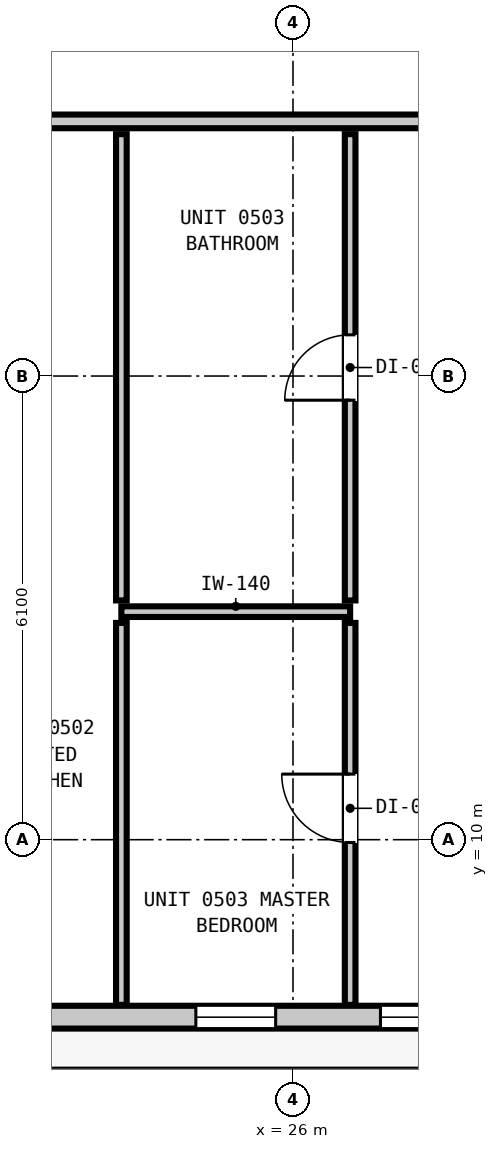
"""IFC4 building model, lengths in metres.
Left out: names, types, materials, properties, quantities, classifications, styles, units other than length and angle.
Written with IfcOpenShell. Run it as: python <this file> out.ifc"""

import sys

from ifc_helpers import new_model, si_unit, direction, frame, frame_2d, origin, place, context, subcontext, project, spatial, rectangle, extrude, element, fill, save


model = new_model("IFC4")
c1 = context("Model", 3, precision=1e-05, world=origin(), true_north=direction((0.0, 1.0)))
c2 = subcontext(c1, "Body", "Model", "MODEL_VIEW")
j1 = project(units=[si_unit("LENGTHUNIT", "METRE"), si_unit("PLANEANGLEUNIT", "RADIAN")], contexts=[c1])
p1 = place(None, origin())
s1 = spatial("IfcSite", under=j1, at=p1, CompositionType="ELEMENT")
p2 = place(p1, origin())
s2 = spatial("IfcBuilding", under=s1, at=p2, CompositionType="ELEMENT")
p3 = place(p2, frame((0.0, 0.0, 22.0)))
s3 = spatial("IfcBuildingStorey", under=s2, at=p3, CompositionType="ELEMENT", Elevation=22.0)
p4 = place(p3, frame((41.635, 7.665, 0.0), z_axis=(0.0, 0.0, 1.0), x_axis=(-1.0, 0.0, 0.0)))
e1 = element("IfcWall", 1, at=p4, inside=s3, PredefinedType="STANDARD", context=c2, shape_type="SweptSolid", body=[
    extrude(rectangle(XDim=37.47, YDim=0.3, at=frame_2d((18.735, 0.0))), origin(), (0.0, 0.0, 1.0), 3.06),
])
p5 = place(p4, frame((1.251, 0.0, 0.0)))
e2 = element("IfcOpeningElement", 2, at=p5, cuts=e1, PredefinedType="OPENING", context=c2, shape_type="SweptSolid", body=[
    extrude(rectangle(XDim=1.0, YDim=2.15, at=frame_2d((0.5, 1.075))), frame((0.0, 0.16, 0.0), z_axis=(0.0, -1.0, 0.0), x_axis=(1.0, 0.0, 0.0)), (0.0, 0.0, 1.0), 0.32),
])
p6 = place(p4, frame((32.31, 0.0, 0.85)))
e3 = element("IfcOpeningElement", 3, at=p6, cuts=e1, PredefinedType="OPENING", context=c2, shape_type="SweptSolid", body=[
    extrude(rectangle(XDim=1.05, YDim=1.65, at=frame_2d((0.525, 0.825))), frame((0.0, 0.16, 0.0), z_axis=(0.0, -1.0, 0.0), x_axis=(1.0, 0.0, 0.0)), (0.0, 0.0, 1.0), 0.32),
])
p7 = place(p4, frame((22.091, 0.0, 0.85)))
e4 = element("IfcOpeningElement", 4, at=p7, cuts=e1, PredefinedType="OPENING", context=c2, shape_type="SweptSolid", body=[
    extrude(rectangle(XDim=1.05, YDim=1.65, at=frame_2d((0.525, 0.825))), frame((0.0, 0.16, 0.0), z_axis=(0.0, -1.0, 0.0), x_axis=(1.0, 0.0, 0.0)), (0.0, 0.0, 1.0), 0.32),
])
p8 = place(p4, frame((24.666, 0.0, 0.85)))
e5 = element("IfcOpeningElement", 5, at=p8, cuts=e1, PredefinedType="OPENING", context=c2, shape_type="SweptSolid", body=[
    extrude(rectangle(XDim=1.05, YDim=1.65, at=frame_2d((0.525, 0.825))), frame((0.0, 0.16, 0.0), z_axis=(0.0, -1.0, 0.0), x_axis=(1.0, 0.0, 0.0)), (0.0, 0.0, 1.0), 0.32),
])
p9 = place(p4, frame((13.434, 0.0, 0.85)))
e6 = element("IfcOpeningElement", 6, at=p9, cuts=e1, PredefinedType="OPENING", context=c2, shape_type="SweptSolid", body=[
    extrude(rectangle(XDim=1.05, YDim=1.65, at=frame_2d((0.525, 0.825))), frame((0.0, 0.16, 0.0), z_axis=(0.0, -1.0, 0.0), x_axis=(1.0, 0.0, 0.0)), (0.0, 0.0, 1.0), 0.32),
])
p10 = place(p4, frame((15.863, 0.0, 0.85)))
e7 = element("IfcOpeningElement", 7, at=p10, cuts=e1, PredefinedType="OPENING", context=c2, shape_type="SweptSolid", body=[
    extrude(rectangle(XDim=1.05, YDim=1.65, at=frame_2d((0.525, 0.825))), frame((0.0, 0.16, 0.0), z_axis=(0.0, -1.0, 0.0), x_axis=(1.0, 0.0, 0.0)), (0.0, 0.0, 1.0), 0.32),
])
p11 = place(p4, frame((6.434, 0.0, 0.85)))
e8 = element("IfcOpeningElement", 8, at=p11, cuts=e1, PredefinedType="OPENING", context=c2, shape_type="SweptSolid", body=[
    extrude(rectangle(XDim=1.05, YDim=1.65, at=frame_2d((0.525, 0.825))), frame((0.0, 0.16, 0.0), z_axis=(0.0, -1.0, 0.0), x_axis=(1.0, 0.0, 0.0)), (0.0, 0.0, 1.0), 0.32),
])
p12 = place(p3, frame((1.827, 19.45, 0.0), z_axis=(0.0, 0.0, 1.0), x_axis=(1.0, 0.0, 0.0)))
e9 = element("IfcWall", 9, at=p12, inside=s3, PredefinedType="PARTITIONING", context=c2, shape_type="SweptSolid", body=[
    extrude(rectangle(XDim=42.146, YDim=0.18, at=frame_2d((21.073, 0.0))), origin(), (0.0, 0.0, 1.0), 3.06),
])
p13 = place(p12, frame((10.283, 0.0, 0.0)))
e10 = element("IfcOpeningElement", 10, at=p13, cuts=e9, PredefinedType="OPENING", context=c2, shape_type="SweptSolid", body=[
    extrude(rectangle(XDim=1.0, YDim=2.15, at=frame_2d((0.5, 1.075))), frame((0.0, 0.1, 0.0), z_axis=(0.0, -1.0, 0.0), x_axis=(1.0, 0.0, 0.0)), (0.0, 0.0, 1.0), 0.2),
])
p14 = place(p12, frame((17.402, 0.0, 0.0)))
e11 = element("IfcOpeningElement", 11, at=p14, cuts=e9, PredefinedType="OPENING", context=c2, shape_type="SweptSolid", body=[
    extrude(rectangle(XDim=1.0, YDim=2.15, at=frame_2d((0.5, 1.075))), frame((0.0, 0.1, 0.0), z_axis=(0.0, -1.0, 0.0), x_axis=(1.0, 0.0, 0.0)), (0.0, 0.0, 1.0), 0.2),
])
p15 = place(p12, frame((25.904, 0.0, 0.0)))
e12 = element("IfcOpeningElement", 12, at=p15, cuts=e9, PredefinedType="OPENING", context=c2, shape_type="SweptSolid", body=[
    extrude(rectangle(XDim=1.0, YDim=2.15, at=frame_2d((0.5, 1.075))), frame((0.0, 0.1, 0.0), z_axis=(0.0, -1.0, 0.0), x_axis=(1.0, 0.0, 0.0)), (0.0, 0.0, 1.0), 0.2),
])
p16 = place(p12, frame((34.899, 0.0, 0.0)))
e13 = element("IfcOpeningElement", 13, at=p16, cuts=e9, PredefinedType="OPENING", context=c2, shape_type="SweptSolid", body=[
    extrude(rectangle(XDim=1.0, YDim=2.15, at=frame_2d((0.5, 1.075))), frame((0.0, 0.1, 0.0), z_axis=(0.0, -1.0, 0.0), x_axis=(1.0, 0.0, 0.0)), (0.0, 0.0, 1.0), 0.2),
])
p17 = place(p3, frame((23.742, 13.0, 0.0), z_axis=(0.0, 0.0, 1.0), x_axis=(1.0, 0.0, 0.0)))
e14 = element("IfcWall", 14, at=p17, inside=s3, PredefinedType="PARTITIONING", context=c2, shape_type="SweptSolid", body=[
    extrude(rectangle(XDim=3.01, YDim=0.14, at=frame_2d((1.505, 0.0))), origin(), (0.0, 0.0, 1.0), 3.06),
])
p18 = place(p3, frame((23.742, 7.827, 0.0), z_axis=(0.0, 0.0, 1.0), x_axis=(0.0, 1.0, 0.0)))
e15 = element("IfcWall", 15, at=p18, inside=s3, PredefinedType="PARTITIONING", context=c2, shape_type="SweptSolid", body=[
    extrude(rectangle(XDim=5.025, YDim=0.14, at=frame_2d((2.513, 0.0))), origin(), (0.0, 0.0, 1.0), 3.06),
])
p19 = place(p3, frame((23.742, 13.148, 0.0), z_axis=(0.0, 0.0, 1.0), x_axis=(0.0, 1.0, 0.0)))
e16 = element("IfcWall", 16, at=p19, inside=s3, PredefinedType="PARTITIONING", context=c2, shape_type="SweptSolid", body=[
    extrude(rectangle(XDim=6.134, YDim=0.14, at=frame_2d((3.067, 0.0))), origin(), (0.0, 0.0, 1.0), 3.06),
])
p20 = place(p3, frame((26.752, 7.827, 0.0), z_axis=(0.0, 0.0, 1.0), x_axis=(0.0, 1.0, 0.0)))
e17 = element("IfcWall", 17, at=p20, inside=s3, PredefinedType="PARTITIONING", context=c2, shape_type="SweptSolid", body=[
    extrude(rectangle(XDim=5.025, YDim=0.14, at=frame_2d((2.513, 0.0))), origin(), (0.0, 0.0, 1.0), 3.06),
])
p21 = place(p20, frame((2.136, 0.0, 0.0)))
e18 = element("IfcOpeningElement", 18, at=p21, cuts=e17, PredefinedType="OPENING", context=c2, shape_type="SweptSolid", body=[
    extrude(rectangle(XDim=0.9, YDim=2.1, at=frame_2d((0.45, 1.05))), frame((0.0, 0.08, 0.0), z_axis=(0.0, -1.0, 0.0), x_axis=(1.0, 0.0, 0.0)), (0.0, 0.0, 1.0), 0.16),
])
p22 = place(p3, frame((26.752, 13.148, 0.0), z_axis=(0.0, 0.0, 1.0), x_axis=(0.0, 1.0, 0.0)))
e19 = element("IfcWall", 19, at=p22, inside=s3, PredefinedType="PARTITIONING", context=c2, shape_type="SweptSolid", body=[
    extrude(rectangle(XDim=6.134, YDim=0.14, at=frame_2d((3.067, 0.0))), origin(), (0.0, 0.0, 1.0), 3.06),
])
p23 = place(p22, frame((2.634, 0.0, 0.0)))
e20 = element("IfcOpeningElement", 20, at=p23, cuts=e19, PredefinedType="OPENING", context=c2, shape_type="SweptSolid", body=[
    extrude(rectangle(XDim=0.86, YDim=2.02, at=frame_2d((0.43, 1.01))), frame((0.0, 0.08, 0.0), z_axis=(0.0, -1.0, 0.0), x_axis=(1.0, 0.0, 0.0)), (0.0, 0.0, 1.0), 0.16),
])
p24 = place(p9, origin())
e21 = element("IfcWindow", 21, at=p24, inside=s3, PartitioningType="SINGLE_PANEL", PredefinedType="WINDOW", context=c2, shape_type="SweptSolid", body=[
    extrude(rectangle(XDim=1.05, YDim=1.65, at=frame_2d((0.525, 0.825))), frame((0.0, 0.03, 0.0), z_axis=(0.0, -1.0, 0.0), x_axis=(1.0, 0.0, 0.0)), (0.0, 0.0, 1.0), 0.06),
])
fill(e6, e21)
p25 = place(p10, origin())
e22 = element("IfcWindow", 22, at=p25, inside=s3, PartitioningType="SINGLE_PANEL", PredefinedType="WINDOW", context=c2, shape_type="SweptSolid", body=[
    extrude(rectangle(XDim=1.05, YDim=1.65, at=frame_2d((0.525, 0.825))), frame((0.0, 0.03, 0.0), z_axis=(0.0, -1.0, 0.0), x_axis=(1.0, 0.0, 0.0)), (0.0, 0.0, 1.0), 0.06),
])
fill(e7, e22)
p26 = place(p23, origin())
e23 = element("IfcDoor", 23, at=p26, inside=s3, OperationType="SINGLE_SWING_LEFT", PredefinedType="DOOR", context=c2, shape_type="SweptSolid", body=[
    extrude(rectangle(XDim=0.86, YDim=2.02, at=frame_2d((0.43, 1.01))), frame((0.0, 0.025, 0.0), z_axis=(0.0, -1.0, 0.0), x_axis=(1.0, 0.0, 0.0)), (0.0, 0.0, 1.0), 0.05),
])
fill(e20, e23)
p27 = place(p21, origin())
e24 = element("IfcDoor", 24, at=p27, inside=s3, OperationType="SINGLE_SWING_RIGHT", PredefinedType="DOOR", context=c2, shape_type="SweptSolid", body=[
    extrude(rectangle(XDim=0.9, YDim=2.1, at=frame_2d((0.45, 1.05))), frame((0.0, 0.025, 0.0), z_axis=(0.0, -1.0, 0.0), x_axis=(1.0, 0.0, 0.0)), (0.0, 0.0, 1.0), 0.05),
])
fill(e18, e24)
save(model, sys.argv[1])
